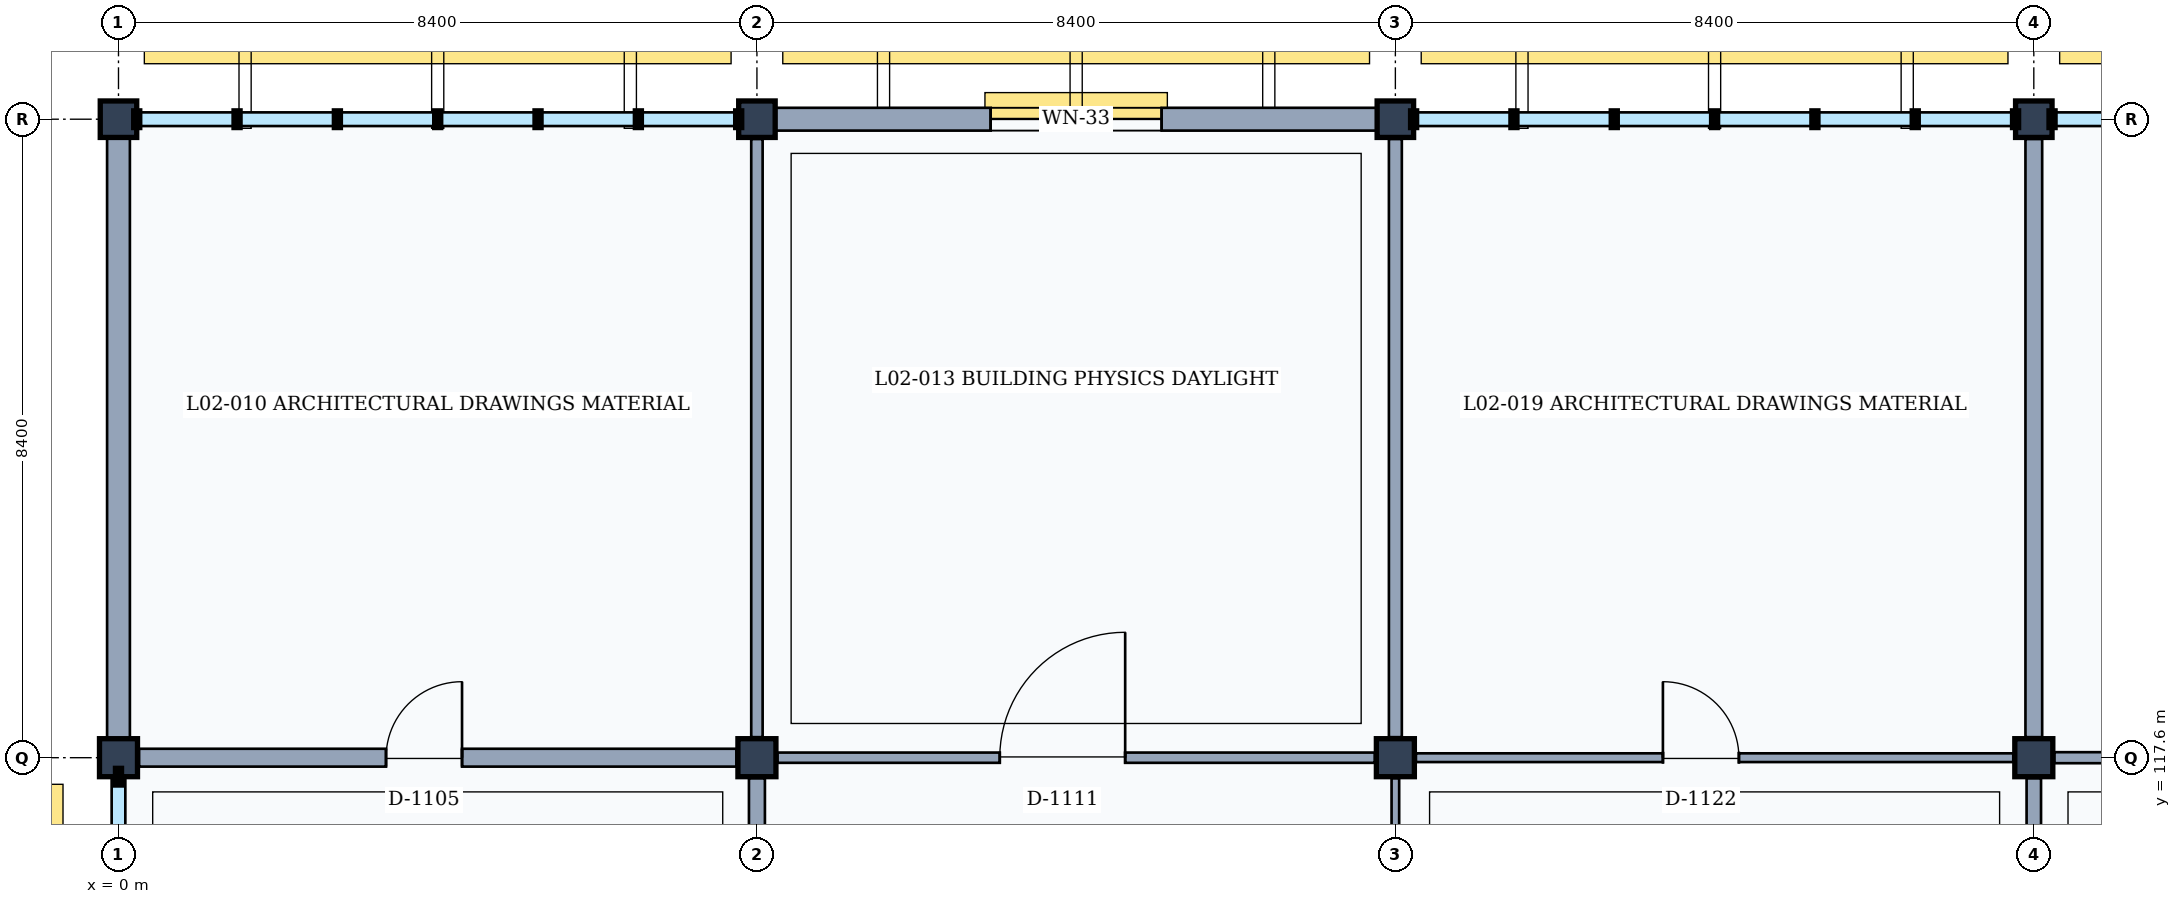
"""IFC4 building model, lengths in metres.
Left out: names, types, materials, properties, quantities, classifications, styles, units other than length and angle.
Written with IfcOpenShell. Run it as: python <this file> out.ifc"""

import sys

from ifc_helpers import new_model, si_unit, direction, frame, frame_2d, origin, origin_2d, place, context, subcontext, project, spatial, rectangle, extrude, element, fill, save


model = new_model("IFC4")
c1 = context("Model", 3, precision=1e-05, world=origin(), true_north=direction((0.0, 1.0)))
c2 = subcontext(c1, "Body", "Model", "MODEL_VIEW")
j1 = project(units=[si_unit("LENGTHUNIT", "METRE"), si_unit("PLANEANGLEUNIT", "RADIAN")], contexts=[c1])
p1 = place(None, origin())
s1 = spatial("IfcSite", under=j1, at=p1, CompositionType="ELEMENT")
p2 = place(p1, origin())
s2 = spatial("IfcBuilding", under=s1, at=p2, CompositionType="ELEMENT")
p3 = place(p2, frame((0.0, 0.0, 9.6)))
s3 = spatial("IfcBuildingStorey", under=s2, at=p3, CompositionType="ELEMENT", Elevation=9.6)
p4 = place(p3, frame((0.0, 117.6, 0.0), z_axis=(0.0, 0.0, 1.0), x_axis=(1.0, 0.0, 0.0)))
e1 = element("IfcColumn", 1, at=p4, inside=s3, PredefinedType="COLUMN", context=c2, shape_type="SweptSolid", body=[
    extrude(rectangle(XDim=0.5, YDim=0.5, at=origin_2d()), origin(), (0.0, 0.0, 1.0), 4.2),
])
p5 = place(p3, frame((0.0, 126.0, 0.0), z_axis=(0.0, 0.0, 1.0), x_axis=(1.0, 0.0, 0.0)))
e2 = element("IfcColumn", 2, at=p5, inside=s3, PredefinedType="COLUMN", context=c2, shape_type="SweptSolid", body=[
    extrude(rectangle(XDim=0.48, YDim=0.48, at=origin_2d()), origin(), (0.0, 0.0, 1.0), 4.2),
])
p6 = place(p3, frame((8.4, 117.6, 0.0), z_axis=(0.0, 0.0, 1.0), x_axis=(1.0, 0.0, 0.0)))
e3 = element("IfcColumn", 3, at=p6, inside=s3, PredefinedType="COLUMN", context=c2, shape_type="SweptSolid", body=[
    extrude(rectangle(XDim=0.5, YDim=0.5, at=origin_2d()), origin(), (0.0, 0.0, 1.0), 4.2),
])
p7 = place(p3, frame((8.4, 126.0, 0.0), z_axis=(0.0, 0.0, 1.0), x_axis=(1.0, 0.0, 0.0)))
e4 = element("IfcColumn", 4, at=p7, inside=s3, PredefinedType="COLUMN", context=c2, shape_type="SweptSolid", body=[
    extrude(rectangle(XDim=0.48, YDim=0.48, at=origin_2d()), origin(), (0.0, 0.0, 1.0), 4.2),
])
p8 = place(p3, frame((16.8, 117.6, 0.0), z_axis=(0.0, 0.0, 1.0), x_axis=(1.0, 0.0, 0.0)))
e5 = element("IfcColumn", 5, at=p8, inside=s3, PredefinedType="COLUMN", context=c2, shape_type="SweptSolid", body=[
    extrude(rectangle(XDim=0.5, YDim=0.5, at=origin_2d()), origin(), (0.0, 0.0, 1.0), 4.2),
])
p9 = place(p3, frame((16.8, 126.0, 0.0), z_axis=(0.0, 0.0, 1.0), x_axis=(1.0, 0.0, 0.0)))
e6 = element("IfcColumn", 6, at=p9, inside=s3, PredefinedType="COLUMN", context=c2, shape_type="SweptSolid", body=[
    extrude(rectangle(XDim=0.48, YDim=0.48, at=origin_2d()), origin(), (0.0, 0.0, 1.0), 4.2),
])
p10 = place(p3, frame((25.2, 117.6, 0.0), z_axis=(0.0, 0.0, 1.0), x_axis=(1.0, 0.0, 0.0)))
e7 = element("IfcColumn", 7, at=p10, inside=s3, PredefinedType="COLUMN", context=c2, shape_type="SweptSolid", body=[
    extrude(rectangle(XDim=0.5, YDim=0.5, at=origin_2d()), origin(), (0.0, 0.0, 1.0), 4.2),
])
p11 = place(p3, frame((25.2, 126.0, 0.0), z_axis=(0.0, 0.0, 1.0), x_axis=(1.0, 0.0, 0.0)))
e8 = element("IfcColumn", 8, at=p11, inside=s3, PredefinedType="COLUMN", context=c2, shape_type="SweptSolid", body=[
    extrude(rectangle(XDim=0.48, YDim=0.48, at=origin_2d()), origin(), (0.0, 0.0, 1.0), 4.2),
])
p12 = place(p3, frame((0.0, 117.85, 0.0), z_axis=(0.0, 0.0, 1.0), x_axis=(0.0, 1.0, 0.0)))
e9 = element("IfcWall", 9, at=p12, inside=s3, PredefinedType="SOLIDWALL", context=c2, shape_type="SweptSolid", body=[
    extrude(rectangle(XDim=7.91, YDim=0.3, at=frame_2d((3.955, 0.0))), origin(), (0.0, 0.0, 1.0), 3.36),
])
p13 = place(p3, frame((8.64, 126.0, 0.0), z_axis=(0.0, 0.0, 1.0), x_axis=(1.0, 0.0, 0.0)))
e10 = element("IfcWall", 10, at=p13, inside=s3, PredefinedType="SOLIDWALL", context=c2, shape_type="SweptSolid", body=[
    extrude(rectangle(XDim=7.92, YDim=0.3, at=frame_2d((3.96, 0.0))), origin(), (0.0, 0.0, 1.0), 3.36),
])
p14 = place(p13, frame((2.835, 0.0, 0.9)))
e11 = element("IfcOpeningElement", 11, at=p14, cuts=e10, PredefinedType="OPENING", context=c2, shape_type="SweptSolid", body=[
    extrude(rectangle(XDim=2.25, YDim=1.6, at=frame_2d((1.125, 0.8))), frame((0.0, 0.16, 0.0), z_axis=(0.0, -1.0, 0.0), x_axis=(1.0, 0.0, 0.0)), (0.0, 0.0, 1.0), 0.32),
])
p15 = place(p3, frame((8.4, 109.46, 0.0), z_axis=(0.0, 0.0, 1.0), x_axis=(0.0, 1.0, 0.0)))
e12 = element("IfcWall", 12, at=p15, inside=s3, PredefinedType="PARTITIONING", context=c2, shape_type="SweptSolid", body=[
    extrude(rectangle(XDim=7.87, YDim=0.21, at=frame_2d((3.935, 0.0))), origin(), (0.0, 0.0, 1.0), 3.32),
])
p16 = place(p3, frame((0.27, 117.6, 0.0), z_axis=(0.0, 0.0, 1.0), x_axis=(1.0, 0.0, 0.0)))
e13 = element("IfcWall", 13, at=p16, inside=s3, PredefinedType="PARTITIONING", context=c2, shape_type="SweptSolid", body=[
    extrude(rectangle(XDim=7.86, YDim=0.235, at=frame_2d((3.93, 0.0))), origin(), (0.0, 0.0, 1.0), 3.32),
])
p17 = place(p16, frame((3.25, 0.0, 0.0)))
e14 = element("IfcOpeningElement", 14, at=p17, cuts=e13, PredefinedType="OPENING", context=c2, shape_type="SweptSolid", body=[
    extrude(rectangle(XDim=1.0, YDim=2.15, at=frame_2d((0.5, 1.075))), frame((0.0, 0.127, 0.0), z_axis=(0.0, -1.0, 0.0), x_axis=(1.0, 0.0, 0.0)), (0.0, 0.0, 1.0), 0.255),
])
p18 = place(p3, frame((8.4, 117.87, 0.0), z_axis=(0.0, 0.0, 1.0), x_axis=(0.0, 1.0, 0.0)))
e15 = element("IfcWall", 15, at=p18, inside=s3, PredefinedType="PARTITIONING", context=c2, shape_type="SweptSolid", body=[
    extrude(rectangle(XDim=7.87, YDim=0.15, at=frame_2d((3.935, 0.0))), origin(), (0.0, 0.0, 1.0), 3.32),
])
p19 = place(p3, frame((16.8, 109.46, 0.0), z_axis=(0.0, 0.0, 1.0), x_axis=(0.0, 1.0, 0.0)))
e16 = element("IfcWall", 16, at=p19, inside=s3, PredefinedType="MOVABLE", context=c2, shape_type="SweptSolid", body=[
    extrude(rectangle(XDim=7.87, YDim=0.1, at=frame_2d((3.935, 0.0))), origin(), (0.0, 0.0, 1.0), 3.32),
])
p20 = place(p19, frame((3.0, 0.0, 0.0)))
e17 = element("IfcOpeningElement", 17, at=p20, cuts=e16, PredefinedType="OPENING", context=c2, shape_type="SweptSolid", body=[
    extrude(rectangle(XDim=1.5, YDim=2.3, at=frame_2d((0.75, 1.15))), frame((0.0, 0.06, 0.0), z_axis=(0.0, -1.0, 0.0), x_axis=(1.0, 0.0, 0.0)), (0.0, 0.0, 1.0), 0.12),
])
p21 = place(p3, frame((8.67, 117.6, 0.0), z_axis=(0.0, 0.0, 1.0), x_axis=(1.0, 0.0, 0.0)))
e18 = element("IfcWall", 18, at=p21, inside=s3, PredefinedType="PARTITIONING", context=c2, shape_type="SweptSolid", body=[
    extrude(rectangle(XDim=7.86, YDim=0.135, at=frame_2d((3.93, 0.0))), origin(), (0.0, 0.0, 1.0), 3.32),
])
p22 = place(p21, frame((2.925, 0.0, 0.0)))
e19 = element("IfcOpeningElement", 19, at=p22, cuts=e18, PredefinedType="OPENING", context=c2, shape_type="SweptSolid", body=[
    extrude(rectangle(XDim=1.65, YDim=2.25, at=frame_2d((0.825, 1.125))), frame((0.0, 0.077, 0.0), z_axis=(0.0, -1.0, 0.0), x_axis=(1.0, 0.0, 0.0)), (0.0, 0.0, 1.0), 0.155),
])
p23 = place(p3, frame((16.8, 117.87, 0.0), z_axis=(0.0, 0.0, 1.0), x_axis=(0.0, 1.0, 0.0)))
e20 = element("IfcWall", 20, at=p23, inside=s3, PredefinedType="PARTITIONING", context=c2, shape_type="SweptSolid", body=[
    extrude(rectangle(XDim=7.87, YDim=0.17, at=frame_2d((3.935, 0.0))), origin(), (0.0, 0.0, 1.0), 3.32),
])
p24 = place(p3, frame((25.2, 109.46, 0.0), z_axis=(0.0, 0.0, 1.0), x_axis=(0.0, 1.0, 0.0)))
e21 = element("IfcWall", 21, at=p24, inside=s3, PredefinedType="PARTITIONING", context=c2, shape_type="SweptSolid", body=[
    extrude(rectangle(XDim=7.87, YDim=0.19, at=frame_2d((3.935, 0.0))), origin(), (0.0, 0.0, 1.0), 3.32),
])
p25 = place(p3, frame((17.07, 117.6, 0.0), z_axis=(0.0, 0.0, 1.0), x_axis=(1.0, 0.0, 0.0)))
e22 = element("IfcWall", 22, at=p25, inside=s3, PredefinedType="PARTITIONING", context=c2, shape_type="SweptSolid", body=[
    extrude(rectangle(XDim=7.86, YDim=0.115, at=frame_2d((3.93, 0.0))), origin(), (0.0, 0.0, 1.0), 3.32),
])
p26 = place(p25, frame((3.25, 0.0, 0.0)))
e23 = element("IfcOpeningElement", 23, at=p26, cuts=e22, PredefinedType="OPENING", context=c2, shape_type="SweptSolid", body=[
    extrude(rectangle(XDim=1.0, YDim=2.15, at=frame_2d((0.5, 1.075))), frame((0.0, 0.067, 0.0), z_axis=(0.0, -1.0, 0.0), x_axis=(1.0, 0.0, 0.0)), (0.0, 0.0, 1.0), 0.135),
])
p27 = place(p3, frame((25.2, 117.87, 0.0), z_axis=(0.0, 0.0, 1.0), x_axis=(0.0, 1.0, 0.0)))
e24 = element("IfcWall", 24, at=p27, inside=s3, PredefinedType="PARTITIONING", context=c2, shape_type="SweptSolid", body=[
    extrude(rectangle(XDim=7.87, YDim=0.22, at=frame_2d((3.935, 0.0))), origin(), (0.0, 0.0, 1.0), 3.32),
])
p28 = place(p3, frame((25.47, 117.6, 0.0), z_axis=(0.0, 0.0, 1.0), x_axis=(1.0, 0.0, 0.0)))
e25 = element("IfcWall", 25, at=p28, inside=s3, PredefinedType="PARTITIONING", context=c2, shape_type="SweptSolid", body=[
    extrude(rectangle(XDim=7.88, YDim=0.145, at=frame_2d((3.94, 0.0))), origin(), (0.0, 0.0, 1.0), 3.32),
])
p29 = place(p28, frame((2.925, 0.0, 0.0)))
e26 = element("IfcOpeningElement", 26, at=p29, cuts=e25, PredefinedType="OPENING", context=c2, shape_type="SweptSolid", body=[
    extrude(rectangle(XDim=1.65, YDim=2.25, at=frame_2d((0.825, 1.125))), frame((0.0, 0.083, 0.0), z_axis=(0.0, -1.0, 0.0), x_axis=(1.0, 0.0, 0.0)), (0.0, 0.0, 1.0), 0.165),
])
p30 = place(p14, origin())
e27 = element("IfcWindow", 27, at=p30, inside=s3, PartitioningType="SINGLE_PANEL", PredefinedType="WINDOW", context=c2, shape_type="SweptSolid", body=[
    extrude(rectangle(XDim=2.25, YDim=1.6, at=frame_2d((1.125, 0.8))), frame((0.0, 0.03, 0.0), z_axis=(0.0, -1.0, 0.0), x_axis=(1.0, 0.0, 0.0)), (0.0, 0.0, 1.0), 0.06),
])
fill(e11, e27)
p31 = place(p17, origin())
e28 = element("IfcDoor", 28, at=p31, inside=s3, OperationType="SINGLE_SWING_RIGHT", PredefinedType="DOOR", context=c2, shape_type="SweptSolid", body=[
    extrude(rectangle(XDim=1.0, YDim=2.15, at=frame_2d((0.5, 1.075))), frame((0.0, 0.025, 0.0), z_axis=(0.0, -1.0, 0.0), x_axis=(1.0, 0.0, 0.0)), (0.0, 0.0, 1.0), 0.05),
])
fill(e14, e28)
p32 = place(p22, origin())
e29 = element("IfcDoor", 29, at=p32, inside=s3, OperationType="SINGLE_SWING_RIGHT", PredefinedType="DOOR", context=c2, shape_type="SweptSolid", body=[
    extrude(rectangle(XDim=1.65, YDim=2.25, at=frame_2d((0.825, 1.125))), frame((0.0, 0.025, 0.0), z_axis=(0.0, -1.0, 0.0), x_axis=(1.0, 0.0, 0.0)), (0.0, 0.0, 1.0), 0.05),
])
fill(e19, e29)
p33 = place(p26, origin())
e30 = element("IfcDoor", 30, at=p33, inside=s3, OperationType="SINGLE_SWING_LEFT", PredefinedType="DOOR", context=c2, shape_type="SweptSolid", body=[
    extrude(rectangle(XDim=1.0, YDim=2.15, at=frame_2d((0.5, 1.075))), frame((0.0, 0.025, 0.0), z_axis=(0.0, -1.0, 0.0), x_axis=(1.0, 0.0, 0.0)), (0.0, 0.0, 1.0), 0.05),
])
fill(e23, e30)
save(model, sys.argv[1])
